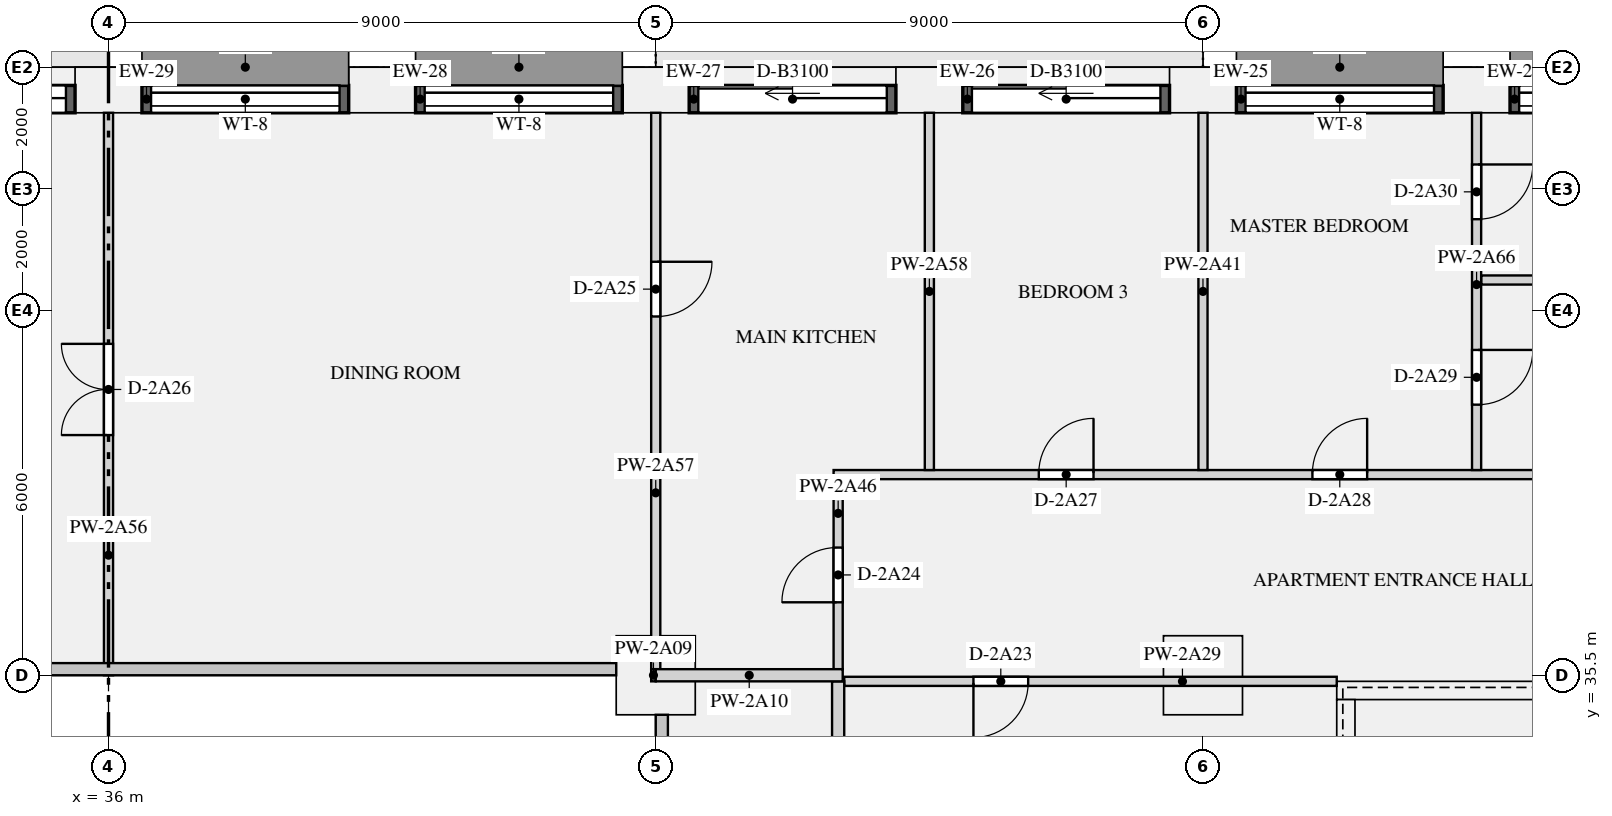
"""IFC4 building model, lengths in metres.
Left out: names, types, materials, properties, quantities, classifications, styles, units other than length and angle.
Written with IfcOpenShell. Run it as: python <this file> out.ifc"""

import sys

from ifc_helpers import new_model, si_unit, direction, frame, frame_2d, origin, origin_2d, place, context, subcontext, project, spatial, rectangle, extrude, element, fill, save


model = new_model("IFC4")
c1 = context("Model", 3, precision=1e-05, world=origin(), true_north=direction((0.0, 1.0)))
c2 = subcontext(c1, "Body", "Model", "MODEL_VIEW")
j1 = project(units=[si_unit("LENGTHUNIT", "METRE"), si_unit("PLANEANGLEUNIT", "RADIAN")], contexts=[c1])
p1 = place(None, origin())
s1 = spatial("IfcSite", under=j1, at=p1, CompositionType="ELEMENT")
p2 = place(p1, origin())
s2 = spatial("IfcBuilding", under=s1, at=p2, CompositionType="ELEMENT")
p3 = place(p2, frame((0.0, 0.0, 83.55)))
s3 = spatial("IfcBuildingStorey", under=s2, at=p3, CompositionType="ELEMENT", Elevation=83.55)
for number, where, z_axis, x_axis in (
    (1, (58.5, 45.125, 0.0), (0.0, 0.0, 1.0), (-1.0, 0.0, 0.0)),
    (2, (54.0, 45.125, 0.0), (0.0, 0.0, 1.0), (-1.0, 0.0, 0.0)),
    (3, (49.5, 45.125, 0.0), (0.0, 0.0, 1.0), (-1.0, 0.0, 0.0)),
    (4, (45.0, 45.125, 0.0), (0.0, 0.0, 1.0), (-1.0, 0.0, 0.0)),
    (5, (40.5, 45.125, 0.0), (0.0, 0.0, 1.0), (-1.0, 0.0, 0.0)),
    (6, (36.0, 45.125, 0.0), (0.0, 0.0, 1.0), (-1.0, 0.0, 0.0)),
):
    element("IfcColumn", number, at=place(p3, frame(where, z_axis=z_axis, x_axis=x_axis)), inside=s3, PredefinedType="USERDEFINED", context=c2, shape_type="SweptSolid", body=[
        extrude(rectangle(XDim=1.1, YDim=0.75, at=origin_2d()), origin(), (0.0, 0.0, 1.0), 3.15),
    ])
for number, where, z_axis, x_axis in (
    (7, (45.0, 35.5, 0.0), (0.0, 0.0, 1.0), (1.0, 0.0, 0.0)),
    (8, (54.0, 35.5, 0.0), (0.0, 0.0, 1.0), (1.0, 0.0, 0.0)),
):
    element("IfcColumn", number, at=place(p3, frame(where, z_axis=z_axis, x_axis=x_axis)), inside=s3, PredefinedType="COLUMN", context=c2, shape_type="SweptSolid", body=[
        extrude(rectangle(XDim=1.3, YDim=1.3, at=origin_2d()), origin(), (0.0, 0.0, 1.0), 3.15),
    ])
p4 = place(p3, frame((56.2, 35.25, 0.0), z_axis=(0.0, 0.0, 1.0), x_axis=(1.0, 0.0, 0.0)))
e9 = element("IfcWall", 9, at=p4, inside=s3, PredefinedType="SHEAR", context=c2, shape_type="SweptSolid", body=[
    extrude(rectangle(XDim=3.6, YDim=0.3, at=frame_2d((1.8, 0.0))), origin(), (0.0, 0.0, 1.0), 3.15),
])
p5 = place(p3, frame((56.35, 27.3, 0.0), z_axis=(0.0, 0.0, 1.0), x_axis=(0.0, 1.0, 0.0)))
e10 = element("IfcWall", 10, at=p5, inside=s3, PredefinedType="SHEAR", context=c2, shape_type="SweptSolid", body=[
    extrude(rectangle(XDim=7.8, YDim=0.3, at=frame_2d((3.9, 0.0))), origin(), (0.0, 0.0, 1.0), 3.15),
])
p6 = place(p3, frame((62.45, 44.975, 0.9), z_axis=(0.0, 0.0, 1.0), x_axis=(-1.0, 0.0, 0.0)))
e11 = element("IfcWall", 11, at=p6, inside=s3, PredefinedType="SOLIDWALL", context=c2, shape_type="SweptSolid", body=[
    extrude(rectangle(XDim=3.4, YDim=0.45, at=frame_2d((1.7, 0.0))), origin(), (0.0, 0.0, 1.0), 1.93),
])
p7 = place(p6, frame((0.15, 0.0, 0.15)))
e12 = element("IfcOpeningElement", 12, at=p7, cuts=e11, PredefinedType="OPENING", context=c2, shape_type="SweptSolid", body=[
    extrude(rectangle(XDim=3.1, YDim=1.5, at=frame_2d((1.55, 0.75))), frame((0.0, 0.235, 0.0), z_axis=(0.0, -1.0, 0.0), x_axis=(1.0, 0.0, 0.0)), (0.0, 0.0, 1.0), 0.47),
])
p8 = place(p3, frame((57.95, 44.975, 0.9), z_axis=(0.0, 0.0, 1.0), x_axis=(-1.0, 0.0, 0.0)))
e13 = element("IfcWall", 13, at=p8, inside=s3, PredefinedType="SOLIDWALL", context=c2, shape_type="SweptSolid", body=[
    extrude(rectangle(XDim=3.4, YDim=0.45, at=frame_2d((1.7, 0.0))), origin(), (0.0, 0.0, 1.0), 1.93),
])
p9 = place(p8, frame((0.15, 0.0, 0.15)))
e14 = element("IfcOpeningElement", 14, at=p9, cuts=e13, PredefinedType="OPENING", context=c2, shape_type="SweptSolid", body=[
    extrude(rectangle(XDim=3.1, YDim=1.5, at=frame_2d((1.55, 0.75))), frame((0.0, 0.235, 0.0), z_axis=(0.0, -1.0, 0.0), x_axis=(1.0, 0.0, 0.0)), (0.0, 0.0, 1.0), 0.47),
])
p10 = place(p3, frame((53.45, 44.975, 0.0), z_axis=(0.0, 0.0, 1.0), x_axis=(-1.0, 0.0, 0.0)))
e15 = element("IfcWall", 15, at=p10, inside=s3, PredefinedType="SOLIDWALL", context=c2, shape_type="SweptSolid", body=[
    extrude(rectangle(XDim=3.4, YDim=0.45, at=frame_2d((1.7, 0.0))), origin(), (0.0, 0.0, 1.0), 2.83),
])
p11 = place(p10, frame((0.15, 0.0, 0.0)))
e16 = element("IfcOpeningElement", 16, at=p11, cuts=e15, PredefinedType="OPENING", context=c2, shape_type="SweptSolid", body=[
    extrude(rectangle(XDim=3.1, YDim=2.3, at=frame_2d((1.55, 1.15))), frame((0.0, 0.235, 0.0), z_axis=(0.0, -1.0, 0.0), x_axis=(1.0, 0.0, 0.0)), (0.0, 0.0, 1.0), 0.47),
])
p12 = place(p3, frame((48.95, 44.975, 0.0), z_axis=(0.0, 0.0, 1.0), x_axis=(-1.0, 0.0, 0.0)))
e17 = element("IfcWall", 17, at=p12, inside=s3, PredefinedType="SOLIDWALL", context=c2, shape_type="SweptSolid", body=[
    extrude(rectangle(XDim=3.4, YDim=0.45, at=frame_2d((1.7, 0.0))), origin(), (0.0, 0.0, 1.0), 2.83),
])
p13 = place(p12, frame((0.15, 0.0, 0.0)))
e18 = element("IfcOpeningElement", 18, at=p13, cuts=e17, PredefinedType="OPENING", context=c2, shape_type="SweptSolid", body=[
    extrude(rectangle(XDim=3.1, YDim=2.3, at=frame_2d((1.55, 1.15))), frame((0.0, 0.235, 0.0), z_axis=(0.0, -1.0, 0.0), x_axis=(1.0, 0.0, 0.0)), (0.0, 0.0, 1.0), 0.47),
])
p14 = place(p3, frame((44.45, 44.975, 0.9), z_axis=(0.0, 0.0, 1.0), x_axis=(-1.0, 0.0, 0.0)))
e19 = element("IfcWall", 19, at=p14, inside=s3, PredefinedType="SOLIDWALL", context=c2, shape_type="SweptSolid", body=[
    extrude(rectangle(XDim=3.4, YDim=0.45, at=frame_2d((1.7, 0.0))), origin(), (0.0, 0.0, 1.0), 1.93),
])
p15 = place(p14, frame((0.15, 0.0, 0.15)))
e20 = element("IfcOpeningElement", 20, at=p15, cuts=e19, PredefinedType="OPENING", context=c2, shape_type="SweptSolid", body=[
    extrude(rectangle(XDim=3.1, YDim=1.5, at=frame_2d((1.55, 0.75))), frame((0.0, 0.235, 0.0), z_axis=(0.0, -1.0, 0.0), x_axis=(1.0, 0.0, 0.0)), (0.0, 0.0, 1.0), 0.47),
])
p16 = place(p3, frame((39.95, 44.975, 0.9), z_axis=(0.0, 0.0, 1.0), x_axis=(-1.0, 0.0, 0.0)))
e21 = element("IfcWall", 21, at=p16, inside=s3, PredefinedType="SOLIDWALL", context=c2, shape_type="SweptSolid", body=[
    extrude(rectangle(XDim=3.4, YDim=0.45, at=frame_2d((1.7, 0.0))), origin(), (0.0, 0.0, 1.0), 1.93),
])
p17 = place(p16, frame((0.15, 0.0, 0.15)))
e22 = element("IfcOpeningElement", 22, at=p17, cuts=e21, PredefinedType="OPENING", context=c2, shape_type="SweptSolid", body=[
    extrude(rectangle(XDim=3.1, YDim=1.5, at=frame_2d((1.55, 0.75))), frame((0.0, 0.235, 0.0), z_axis=(0.0, -1.0, 0.0), x_axis=(1.0, 0.0, 0.0)), (0.0, 0.0, 1.0), 0.47),
])
p18 = place(p3, frame((35.45, 44.975, 0.0), z_axis=(0.0, 0.0, 1.0), x_axis=(-1.0, 0.0, 0.0)))
e23 = element("IfcWall", 23, at=p18, inside=s3, PredefinedType="SOLIDWALL", context=c2, shape_type="SweptSolid", body=[
    extrude(rectangle(XDim=3.4, YDim=0.45, at=frame_2d((1.7, 0.0))), origin(), (0.0, 0.0, 1.0), 2.83),
])
p19 = place(p18, frame((0.15, 0.0, 0.0)))
e24 = element("IfcOpeningElement", 24, at=p19, cuts=e23, PredefinedType="OPENING", context=c2, shape_type="SweptSolid", body=[
    extrude(rectangle(XDim=3.1, YDim=2.3, at=frame_2d((1.55, 1.15))), frame((0.0, 0.235, 0.0), z_axis=(0.0, -1.0, 0.0), x_axis=(1.0, 0.0, 0.0)), (0.0, 0.0, 1.0), 0.47),
])
p20 = place(p3, frame((44.925, 35.5, 0.0), z_axis=(0.0, 0.0, 1.0), x_axis=(1.0, 0.0, 0.0)))
e25 = element("IfcWall", 25, at=p20, inside=s3, PredefinedType="PARTITIONING", context=c2, shape_type="SweptSolid", body=[
    extrude(rectangle(XDim=0.075, YDim=0.2, at=frame_2d((0.038, 0.0))), origin(), (0.0, 0.0, 1.0), 2.83),
])
p21 = place(p3, frame((45.0, 35.5, 0.0), z_axis=(0.0, 0.0, 1.0), x_axis=(1.0, 0.0, 0.0)))
e26 = element("IfcWall", 26, at=p21, inside=s3, PredefinedType="PARTITIONING", context=c2, shape_type="SweptSolid", body=[
    extrude(rectangle(XDim=3.075, YDim=0.2, at=frame_2d((1.538, 0.0))), origin(), (0.0, 0.0, 1.0), 2.83),
])
p22 = place(p3, frame((48.1, 35.4, 0.0), z_axis=(0.0, 0.0, 1.0), x_axis=(1.0, 0.0, 0.0)))
e27 = element("IfcWall", 27, at=p22, inside=s3, PredefinedType="PARTITIONING", context=c2, shape_type="SweptSolid", body=[
    extrude(rectangle(XDim=8.1, YDim=0.15, at=frame_2d((4.05, 0.0))), origin(), (0.0, 0.0, 1.0), 2.83),
])
p23 = place(p22, frame((2.125, 0.0, 0.0)))
e28 = element("IfcOpeningElement", 28, at=p23, cuts=e27, PredefinedType="OPENING", context=c2, shape_type="SweptSolid", body=[
    extrude(rectangle(XDim=0.9, YDim=2.1, at=frame_2d((0.45, 1.05))), frame((0.0, 0.085, 0.0), z_axis=(0.0, -1.0, 0.0), x_axis=(1.0, 0.0, 0.0)), (0.0, 0.0, 1.0), 0.17),
])
p24 = place(p3, frame((47.925, 38.8, 0.0), z_axis=(0.0, 0.0, 1.0), x_axis=(1.0, 0.0, 0.0)))
e29 = element("IfcWall", 29, at=p24, inside=s3, PredefinedType="PARTITIONING", context=c2, shape_type="SweptSolid", body=[
    extrude(rectangle(XDim=19.475, YDim=0.15, at=frame_2d((9.737, 0.0))), origin(), (0.0, 0.0, 1.0), 2.83),
])
p25 = place(p24, frame((3.375, 0.0, 0.0)))
e30 = element("IfcOpeningElement", 30, at=p25, cuts=e29, PredefinedType="OPENING", context=c2, shape_type="SweptSolid", body=[
    extrude(rectangle(XDim=0.9, YDim=2.1, at=frame_2d((0.45, 1.05))), frame((0.0, 0.085, 0.0), z_axis=(0.0, -1.0, 0.0), x_axis=(1.0, 0.0, 0.0)), (0.0, 0.0, 1.0), 0.17),
])
p26 = place(p24, frame((7.875, 0.0, 0.0)))
e31 = element("IfcOpeningElement", 31, at=p26, cuts=e29, PredefinedType="OPENING", context=c2, shape_type="SweptSolid", body=[
    extrude(rectangle(XDim=0.9, YDim=2.1, at=frame_2d((0.45, 1.05))), frame((0.0, 0.085, 0.0), z_axis=(0.0, -1.0, 0.0), x_axis=(1.0, 0.0, 0.0)), (0.0, 0.0, 1.0), 0.17),
])
p27 = place(p24, frame((16.875, 0.0, 0.0)))
e32 = element("IfcOpeningElement", 32, at=p27, cuts=e29, PredefinedType="OPENING", context=c2, shape_type="SweptSolid", body=[
    extrude(rectangle(XDim=0.9, YDim=2.1, at=frame_2d((0.45, 1.05))), frame((0.0, 0.085, 0.0), z_axis=(0.0, -1.0, 0.0), x_axis=(1.0, 0.0, 0.0)), (0.0, 0.0, 1.0), 0.17),
])
p28 = place(p3, frame((58.575, 42.0, 0.0), z_axis=(0.0, 0.0, 1.0), x_axis=(1.0, 0.0, 0.0)))
e33 = element("IfcWall", 33, at=p28, inside=s3, PredefinedType="PARTITIONING", context=c2, shape_type="SweptSolid", body=[
    extrude(rectangle(XDim=4.35, YDim=0.15, at=frame_2d((2.175, 0.0))), origin(), (0.0, 0.0, 1.0), 2.83),
])
p29 = place(p3, frame((54.0, 38.875, 0.0), z_axis=(0.0, 0.0, 1.0), x_axis=(0.0, 1.0, 0.0)))
e34 = element("IfcWall", 34, at=p29, inside=s3, PredefinedType="PARTITIONING", context=c2, shape_type="SweptSolid", body=[
    extrude(rectangle(XDim=5.875, YDim=0.15, at=frame_2d((2.938, 0.0))), origin(), (0.0, 0.0, 1.0), 2.83),
])
p30 = place(p3, frame((48.0, 35.6, 0.0), z_axis=(0.0, 0.0, 1.0), x_axis=(0.0, 1.0, 0.0)))
e35 = element("IfcWall", 35, at=p30, inside=s3, PredefinedType="PARTITIONING", context=c2, shape_type="SweptSolid", body=[
    extrude(rectangle(XDim=3.125, YDim=0.15, at=frame_2d((1.562, 0.0))), origin(), (0.0, 0.0, 1.0), 2.83),
])
p31 = place(p30, frame((1.1, 0.0, 0.0)))
e36 = element("IfcOpeningElement", 36, at=p31, cuts=e35, PredefinedType="OPENING", context=c2, shape_type="SweptSolid", body=[
    extrude(rectangle(XDim=0.9, YDim=2.1, at=frame_2d((0.45, 1.05))), frame((0.0, 0.085, 0.0), z_axis=(0.0, -1.0, 0.0), x_axis=(1.0, 0.0, 0.0)), (0.0, 0.0, 1.0), 0.17),
])
p32 = place(p3, frame((48.0, 27.1, 0.0), z_axis=(0.0, 0.0, 1.0), x_axis=(0.0, 1.0, 0.0)))
e37 = element("IfcWall", 37, at=p32, inside=s3, PredefinedType="PARTITIONING", context=c2, shape_type="SweptSolid", body=[
    extrude(rectangle(XDim=8.3, YDim=0.2, at=frame_2d((4.15, 0.0))), origin(), (0.0, 0.0, 1.0), 2.83),
])
p33 = place(p32, frame((4.35, 0.0, 0.0)))
e38 = element("IfcOpeningElement", 38, at=p33, cuts=e37, PredefinedType="OPENING", context=c2, shape_type="SweptSolid", body=[
    extrude(rectangle(XDim=1.1, YDim=2.1, at=frame_2d((0.55, 1.05))), frame((0.0, 0.11, 0.0), z_axis=(0.0, -1.0, 0.0), x_axis=(1.0, 0.0, 0.0)), (0.0, 0.0, 1.0), 0.22),
])
p34 = place(p3, frame((36.0, 35.5, 0.0), z_axis=(0.0, 0.0, 1.0), x_axis=(0.0, 1.0, 0.0)))
e39 = element("IfcWall", 39, at=p34, inside=s3, PredefinedType="PARTITIONING", context=c2, shape_type="SweptSolid", body=[
    extrude(rectangle(XDim=9.25, YDim=0.15, at=frame_2d((4.625, 0.0))), origin(), (0.0, 0.0, 1.0), 2.83),
])
p35 = place(p34, frame((3.95, 0.0, 0.0)))
e40 = element("IfcOpeningElement", 40, at=p35, cuts=e39, PredefinedType="OPENING", context=c2, shape_type="SweptSolid", body=[
    extrude(rectangle(XDim=1.5, YDim=2.1, at=frame_2d((0.75, 1.05))), frame((0.0, 0.085, 0.0), z_axis=(0.0, -1.0, 0.0), x_axis=(1.0, 0.0, 0.0)), (0.0, 0.0, 1.0), 0.17),
])
p36 = place(p3, frame((45.0, 35.6, 0.0), z_axis=(0.0, 0.0, 1.0), x_axis=(0.0, 1.0, 0.0)))
e41 = element("IfcWall", 41, at=p36, inside=s3, PredefinedType="PARTITIONING", context=c2, shape_type="SweptSolid", body=[
    extrude(rectangle(XDim=9.15, YDim=0.15, at=frame_2d((4.575, 0.0))), origin(), (0.0, 0.0, 1.0), 2.83),
])
p37 = place(p36, frame((5.8, 0.0, 0.0)))
e42 = element("IfcOpeningElement", 42, at=p37, cuts=e41, PredefinedType="OPENING", context=c2, shape_type="SweptSolid", body=[
    extrude(rectangle(XDim=0.9, YDim=2.1, at=frame_2d((0.45, 1.05))), frame((0.0, 0.085, 0.0), z_axis=(0.0, -1.0, 0.0), x_axis=(1.0, 0.0, 0.0)), (0.0, 0.0, 1.0), 0.17),
])
p38 = place(p3, frame((49.5, 38.875, 0.0), z_axis=(0.0, 0.0, 1.0), x_axis=(0.0, 1.0, 0.0)))
e43 = element("IfcWall", 43, at=p38, inside=s3, PredefinedType="PARTITIONING", context=c2, shape_type="SweptSolid", body=[
    extrude(rectangle(XDim=5.875, YDim=0.15, at=frame_2d((2.938, 0.0))), origin(), (0.0, 0.0, 1.0), 2.83),
])
p39 = place(p3, frame((58.5, 38.875, 0.0), z_axis=(0.0, 0.0, 1.0), x_axis=(0.0, 1.0, 0.0)))
e44 = element("IfcWall", 44, at=p39, inside=s3, PredefinedType="PARTITIONING", context=c2, shape_type="SweptSolid", body=[
    extrude(rectangle(XDim=5.875, YDim=0.15, at=frame_2d((2.938, 0.0))), origin(), (0.0, 0.0, 1.0), 2.83),
])
p40 = place(p39, frame((1.075, 0.0, 0.0)))
e45 = element("IfcOpeningElement", 45, at=p40, cuts=e44, PredefinedType="OPENING", context=c2, shape_type="SweptSolid", body=[
    extrude(rectangle(XDim=0.9, YDim=2.1, at=frame_2d((0.45, 1.05))), frame((0.0, 0.085, 0.0), z_axis=(0.0, -1.0, 0.0), x_axis=(1.0, 0.0, 0.0)), (0.0, 0.0, 1.0), 0.17),
])
p41 = place(p39, frame((4.125, 0.0, 0.0)))
e46 = element("IfcOpeningElement", 46, at=p41, cuts=e44, PredefinedType="OPENING", context=c2, shape_type="SweptSolid", body=[
    extrude(rectangle(XDim=0.9, YDim=2.1, at=frame_2d((0.45, 1.05))), frame((0.0, 0.085, 0.0), z_axis=(0.0, -1.0, 0.0), x_axis=(1.0, 0.0, 0.0)), (0.0, 0.0, 1.0), 0.17),
])
p42 = place(p7, origin())
e47 = element("IfcWindow", 47, at=p42, inside=s3, PartitioningType="SINGLE_PANEL", PredefinedType="WINDOW", context=c2, shape_type="SweptSolid", body=[
    extrude(rectangle(XDim=3.1, YDim=1.5, at=frame_2d((1.55, 0.75))), frame((0.0, -0.065, 0.0), z_axis=(0.0, -1.0, 0.0), x_axis=(1.0, 0.0, 0.0)), (0.0, 0.0, 1.0), 0.06),
])
fill(e12, e47)
p43 = place(p9, origin())
e48 = element("IfcWindow", 48, at=p43, inside=s3, PartitioningType="SINGLE_PANEL", PredefinedType="WINDOW", context=c2, shape_type="SweptSolid", body=[
    extrude(rectangle(XDim=3.1, YDim=1.5, at=frame_2d((1.55, 0.75))), frame((0.0, -0.065, 0.0), z_axis=(0.0, -1.0, 0.0), x_axis=(1.0, 0.0, 0.0)), (0.0, 0.0, 1.0), 0.06),
])
fill(e14, e48)
p44 = place(p11, origin())
e49 = element("IfcDoor", 49, at=p44, inside=s3, OperationType="SLIDING_TO_LEFT", PredefinedType="DOOR", context=c2, shape_type="SweptSolid", body=[
    extrude(rectangle(XDim=3.1, YDim=2.3, at=frame_2d((1.55, 1.15))), frame((0.0, -0.07, 0.0), z_axis=(0.0, -1.0, 0.0), x_axis=(1.0, 0.0, 0.0)), (0.0, 0.0, 1.0), 0.05),
])
fill(e16, e49)
p45 = place(p13, origin())
e50 = element("IfcDoor", 50, at=p45, inside=s3, OperationType="SLIDING_TO_LEFT", PredefinedType="DOOR", context=c2, shape_type="SweptSolid", body=[
    extrude(rectangle(XDim=3.1, YDim=2.3, at=frame_2d((1.55, 1.15))), frame((0.0, -0.07, 0.0), z_axis=(0.0, -1.0, 0.0), x_axis=(1.0, 0.0, 0.0)), (0.0, 0.0, 1.0), 0.05),
])
fill(e18, e50)
p46 = place(p15, origin())
e51 = element("IfcWindow", 51, at=p46, inside=s3, PartitioningType="SINGLE_PANEL", PredefinedType="WINDOW", context=c2, shape_type="SweptSolid", body=[
    extrude(rectangle(XDim=3.1, YDim=1.5, at=frame_2d((1.55, 0.75))), frame((0.0, -0.065, 0.0), z_axis=(0.0, -1.0, 0.0), x_axis=(1.0, 0.0, 0.0)), (0.0, 0.0, 1.0), 0.06),
])
fill(e20, e51)
p47 = place(p17, origin())
e52 = element("IfcWindow", 52, at=p47, inside=s3, PartitioningType="SINGLE_PANEL", PredefinedType="WINDOW", context=c2, shape_type="SweptSolid", body=[
    extrude(rectangle(XDim=3.1, YDim=1.5, at=frame_2d((1.55, 0.75))), frame((0.0, -0.065, 0.0), z_axis=(0.0, -1.0, 0.0), x_axis=(1.0, 0.0, 0.0)), (0.0, 0.0, 1.0), 0.06),
])
fill(e22, e52)
p48 = place(p19, origin())
e53 = element("IfcDoor", 53, at=p48, inside=s3, OperationType="SLIDING_TO_LEFT", PredefinedType="DOOR", context=c2, shape_type="SweptSolid", body=[
    extrude(rectangle(XDim=3.1, YDim=2.3, at=frame_2d((1.55, 1.15))), frame((0.0, -0.07, 0.0), z_axis=(0.0, -1.0, 0.0), x_axis=(1.0, 0.0, 0.0)), (0.0, 0.0, 1.0), 0.05),
])
fill(e24, e53)
p49 = place(p23, frame((0.9, 0.0, 0.0), z_axis=(0.0, 0.0, 1.0), x_axis=(-1.0, 0.0, 0.0)))
e54 = element("IfcDoor", 54, at=p49, inside=s3, OperationType="SINGLE_SWING_RIGHT", PredefinedType="DOOR", context=c2, shape_type="SweptSolid", body=[
    extrude(rectangle(XDim=0.9, YDim=2.1, at=frame_2d((0.45, 1.05))), frame((0.0, 0.025, 0.0), z_axis=(0.0, -1.0, 0.0), x_axis=(1.0, 0.0, 0.0)), (0.0, 0.0, 1.0), 0.05),
])
fill(e28, e54)
p50 = place(p31, origin())
e55 = element("IfcDoor", 55, at=p50, inside=s3, OperationType="SINGLE_SWING_LEFT", PredefinedType="DOOR", context=c2, shape_type="SweptSolid", body=[
    extrude(rectangle(XDim=0.9, YDim=2.1, at=frame_2d((0.45, 1.05))), frame((0.0, 0.025, 0.0), z_axis=(0.0, -1.0, 0.0), x_axis=(1.0, 0.0, 0.0)), (0.0, 0.0, 1.0), 0.05),
])
fill(e36, e55)
p51 = place(p37, frame((0.9, 0.0, 0.0), z_axis=(0.0, 0.0, 1.0), x_axis=(-1.0, 0.0, 0.0)))
e56 = element("IfcDoor", 56, at=p51, inside=s3, OperationType="SINGLE_SWING_LEFT", PredefinedType="DOOR", context=c2, shape_type="SweptSolid", body=[
    extrude(rectangle(XDim=0.9, YDim=2.1, at=frame_2d((0.45, 1.05))), frame((0.0, 0.025, 0.0), z_axis=(0.0, -1.0, 0.0), x_axis=(1.0, 0.0, 0.0)), (0.0, 0.0, 1.0), 0.05),
])
fill(e42, e56)
p52 = place(p35, origin())
e57 = element("IfcDoor", 57, at=p52, inside=s3, OperationType="DOUBLE_DOOR_SINGLE_SWING", PredefinedType="DOOR", context=c2, shape_type="SweptSolid", body=[
    extrude(rectangle(XDim=1.5, YDim=2.1, at=frame_2d((0.75, 1.05))), frame((0.0, 0.025, 0.0), z_axis=(0.0, -1.0, 0.0), x_axis=(1.0, 0.0, 0.0)), (0.0, 0.0, 1.0), 0.05),
])
fill(e40, e57)
p53 = place(p25, origin())
e58 = element("IfcDoor", 58, at=p53, inside=s3, OperationType="SINGLE_SWING_RIGHT", PredefinedType="DOOR", context=c2, shape_type="SweptSolid", body=[
    extrude(rectangle(XDim=0.9, YDim=2.1, at=frame_2d((0.45, 1.05))), frame((0.0, 0.025, 0.0), z_axis=(0.0, -1.0, 0.0), x_axis=(1.0, 0.0, 0.0)), (0.0, 0.0, 1.0), 0.05),
])
fill(e30, e58)
p54 = place(p26, origin())
e59 = element("IfcDoor", 59, at=p54, inside=s3, OperationType="SINGLE_SWING_RIGHT", PredefinedType="DOOR", context=c2, shape_type="SweptSolid", body=[
    extrude(rectangle(XDim=0.9, YDim=2.1, at=frame_2d((0.45, 1.05))), frame((0.0, 0.025, 0.0), z_axis=(0.0, -1.0, 0.0), x_axis=(1.0, 0.0, 0.0)), (0.0, 0.0, 1.0), 0.05),
])
fill(e31, e59)
p55 = place(p40, frame((0.9, 0.0, 0.0), z_axis=(0.0, 0.0, 1.0), x_axis=(-1.0, 0.0, 0.0)))
e60 = element("IfcDoor", 60, at=p55, inside=s3, OperationType="SINGLE_SWING_LEFT", PredefinedType="DOOR", context=c2, shape_type="SweptSolid", body=[
    extrude(rectangle(XDim=0.9, YDim=2.1, at=frame_2d((0.45, 1.05))), frame((0.0, 0.025, 0.0), z_axis=(0.0, -1.0, 0.0), x_axis=(1.0, 0.0, 0.0)), (0.0, 0.0, 1.0), 0.05),
])
fill(e45, e60)
p56 = place(p41, frame((0.9, 0.0, 0.0), z_axis=(0.0, 0.0, 1.0), x_axis=(-1.0, 0.0, 0.0)))
e61 = element("IfcDoor", 61, at=p56, inside=s3, OperationType="SINGLE_SWING_LEFT", PredefinedType="DOOR", context=c2, shape_type="SweptSolid", body=[
    extrude(rectangle(XDim=0.9, YDim=2.1, at=frame_2d((0.45, 1.05))), frame((0.0, 0.025, 0.0), z_axis=(0.0, -1.0, 0.0), x_axis=(1.0, 0.0, 0.0)), (0.0, 0.0, 1.0), 0.05),
])
fill(e46, e61)
save(model, sys.argv[1])
